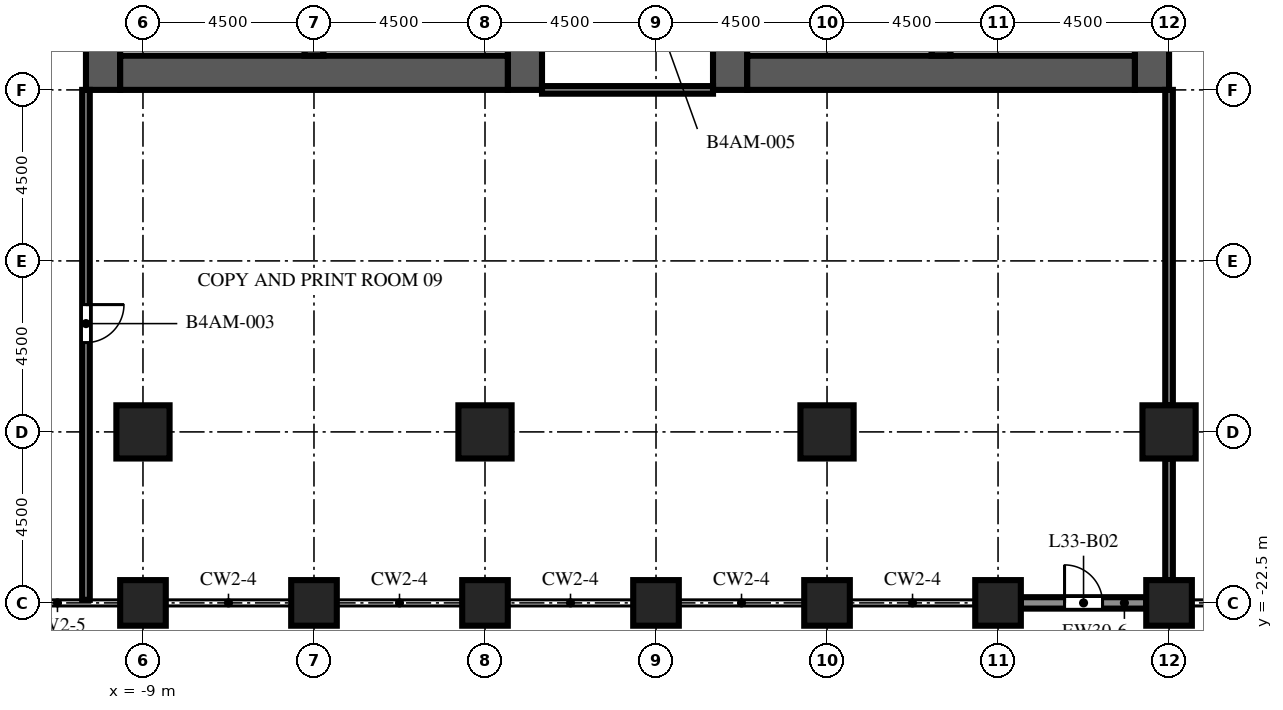
"""IFC4 building model, lengths in metres.
Left out: names, types, materials, properties, quantities, classifications, styles, units other than length and angle.
Written with IfcOpenShell. Run it as: python <this file> out.ifc"""

import sys

from ifc_helpers import new_model, si_unit, direction, frame, frame_2d, origin, origin_2d, place, context, subcontext, project, spatial, rectangle, extrude, element, fill, save


model = new_model("IFC4")
c1 = context("Model", 3, precision=1e-05, world=origin(), true_north=direction((0.0, 1.0)))
c2 = subcontext(c1, "Body", "Model", "MODEL_VIEW")
j1 = project(units=[si_unit("LENGTHUNIT", "METRE"), si_unit("PLANEANGLEUNIT", "RADIAN")], contexts=[c1])
p1 = place(None, origin())
s1 = spatial("IfcSite", under=j1, at=p1, CompositionType="ELEMENT")
p2 = place(p1, origin())
s2 = spatial("IfcBuilding", under=s1, at=p2, CompositionType="ELEMENT")
p3 = place(p2, frame((0.0, 0.0, 145.4)))
s3 = spatial("IfcBuildingStorey", under=s2, at=p3, CompositionType="ELEMENT", Elevation=145.4)
for number, where, z_axis, x_axis in (
    (1, (-9.0, -22.5, 0.0), (0.0, 0.0, 1.0), (1.0, 0.0, 0.0)),
    (2, (-4.5, -22.5, 0.0), (0.0, 0.0, 1.0), (1.0, 0.0, 0.0)),
    (3, (0.0, -22.5, 0.0), (0.0, 0.0, 1.0), (1.0, 0.0, 0.0)),
    (4, (4.5, -22.5, 0.0), (0.0, 0.0, 1.0), (1.0, 0.0, 0.0)),
    (5, (9.0, -22.5, 0.0), (0.0, 0.0, 1.0), (1.0, 0.0, 0.0)),
    (6, (13.5, -22.5, 0.0), (0.0, 0.0, 1.0), (1.0, 0.0, 0.0)),
    (7, (18.0, -22.5, 0.0), (0.0, 0.0, 1.0), (1.0, 0.0, 0.0)),
):
    element("IfcColumn", number, at=place(p3, frame(where, z_axis=z_axis, x_axis=x_axis)), inside=s3, PredefinedType="COLUMN", context=c2, shape_type="SweptSolid", body=[
        extrude(rectangle(XDim=1.2, YDim=1.2, at=origin_2d()), origin(), (0.0, 0.0, 1.0), 6.0),
    ])
for number, where, z_axis, x_axis in (
    (8, (-9.0, -18.0, 0.0), (0.0, 0.0, 1.0), (1.0, 0.0, 0.0)),
    (9, (0.0, -18.0, 0.0), (0.0, 0.0, 1.0), (1.0, 0.0, 0.0)),
    (10, (9.0, -18.0, 0.0), (0.0, 0.0, 1.0), (1.0, 0.0, 0.0)),
    (11, (18.0, -18.0, 0.0), (0.0, 0.0, 1.0), (1.0, 0.0, 0.0)),
):
    element("IfcColumn", number, at=place(p3, frame(where, z_axis=z_axis, x_axis=x_axis)), inside=s3, PredefinedType="COLUMN", context=c2, shape_type="SweptSolid", body=[
        extrude(rectangle(XDim=1.4, YDim=1.4, at=origin_2d()), origin(), (0.0, 0.0, 1.0), 6.0),
    ])
p4 = place(p3, frame((-10.05, -9.0, 0.0), z_axis=(0.0, 0.0, 1.0), x_axis=(0.0, 1.0, 0.0)))
e12 = element("IfcWall", 12, at=p4, inside=s3, PredefinedType="SHEAR", context=c2, shape_type="SweptSolid", body=[
    extrude(rectangle(XDim=27.5, YDim=0.9, at=frame_2d((13.75, 0.0))), origin(), (0.0, 0.0, 1.0), 6.0),
])
p5 = place(p4, frame((12.55, 0.0, 0.0)))
e13 = element("IfcOpeningElement", 13, at=p5, cuts=e12, PredefinedType="OPENING", context=c2, shape_type="SweptSolid", body=[
    extrude(rectangle(XDim=2.4, YDim=2.4, at=frame_2d((1.2, 1.2))), frame((0.0, 0.46, 0.0), z_axis=(0.0, -1.0, 0.0), x_axis=(1.0, 0.0, 0.0)), (0.0, 0.0, 1.0), 0.92),
])
p6 = place(p4, frame((6.825, 0.0, 0.0)))
e14 = element("IfcOpeningElement", 14, at=p6, cuts=e12, PredefinedType="OPENING", context=c2, shape_type="SweptSolid", body=[
    extrude(rectangle(XDim=1.2, YDim=2.1, at=frame_2d((0.6, 1.05))), frame((0.0, 0.46, 0.0), z_axis=(0.0, -1.0, 0.0), x_axis=(1.0, 0.0, 0.0)), (0.0, 0.0, 1.0), 0.92),
])
p7 = place(p4, frame((19.475, 0.0, 0.0)))
e15 = element("IfcOpeningElement", 15, at=p7, cuts=e12, PredefinedType="OPENING", context=c2, shape_type="SweptSolid", body=[
    extrude(rectangle(XDim=1.2, YDim=2.1, at=frame_2d((0.6, 1.05))), frame((0.0, 0.46, 0.0), z_axis=(0.0, -1.0, 0.0), x_axis=(1.0, 0.0, 0.0)), (0.0, 0.0, 1.0), 0.92),
])
p8 = place(p3, frame((1.05, -9.0, 0.0), z_axis=(0.0, 0.0, 1.0), x_axis=(0.0, 1.0, 0.0)))
e16 = element("IfcWall", 16, at=p8, inside=s3, PredefinedType="SHEAR", context=c2, shape_type="SweptSolid", body=[
    extrude(rectangle(XDim=27.5, YDim=0.9, at=frame_2d((13.75, 0.0))), origin(), (0.0, 0.0, 1.0), 6.0),
])
p9 = place(p8, frame((12.55, 0.0, 0.0)))
e17 = element("IfcOpeningElement", 17, at=p9, cuts=e16, PredefinedType="OPENING", context=c2, shape_type="SweptSolid", body=[
    extrude(rectangle(XDim=2.4, YDim=2.4, at=frame_2d((1.2, 1.2))), frame((0.0, 0.46, 0.0), z_axis=(0.0, -1.0, 0.0), x_axis=(1.0, 0.0, 0.0)), (0.0, 0.0, 1.0), 0.92),
])
p10 = place(p8, frame((5.51, 0.0, 0.0)))
e18 = element("IfcOpeningElement", 18, at=p10, cuts=e16, PredefinedType="OPENING", context=c2, shape_type="SweptSolid", body=[
    extrude(rectangle(XDim=0.923, YDim=2.1, at=frame_2d((0.461, 1.05))), frame((0.0, 0.46, 0.0), z_axis=(0.0, -1.0, 0.0), x_axis=(1.0, 0.0, 0.0)), (0.0, 0.0, 1.0), 0.92),
])
p11 = place(p8, frame((23.427, 0.0, 0.0)))
e19 = element("IfcOpeningElement", 19, at=p11, cuts=e16, PredefinedType="OPENING", context=c2, shape_type="SweptSolid", body=[
    extrude(rectangle(XDim=1.2, YDim=2.1, at=frame_2d((0.6, 1.05))), frame((0.0, 0.46, 0.0), z_axis=(0.0, -1.0, 0.0), x_axis=(1.0, 0.0, 0.0)), (0.0, 0.0, 1.0), 0.92),
])
p12 = place(p3, frame((-9.6, -8.55, 0.0), z_axis=(0.0, 0.0, 1.0), x_axis=(1.0, 0.0, 0.0)))
e20 = element("IfcWall", 20, at=p12, inside=s3, PredefinedType="SHEAR", context=c2, shape_type="SweptSolid", body=[
    extrude(rectangle(XDim=10.2, YDim=0.9, at=frame_2d((5.1, 0.0))), origin(), (0.0, 0.0, 1.0), 6.0),
])
p13 = place(p3, frame((-4.5, -8.1, 0.0), z_axis=(0.0, 0.0, 1.0), x_axis=(0.0, 1.0, 0.0)))
e21 = element("IfcWall", 21, at=p13, inside=s3, PredefinedType="SHEAR", context=c2, shape_type="SweptSolid", body=[
    extrude(rectangle(XDim=7.35, YDim=0.5, at=frame_2d((3.675, 0.0))), origin(), (0.0, 0.0, 1.0), 6.0),
])
p14 = place(p3, frame((6.45, -9.0, 0.0), z_axis=(0.0, 0.0, 1.0), x_axis=(0.0, 1.0, 0.0)))
e22 = element("IfcWall", 22, at=p14, inside=s3, PredefinedType="SHEAR", context=c2, shape_type="SweptSolid", body=[
    extrude(rectangle(XDim=27.5, YDim=0.9, at=frame_2d((13.75, 0.0))), origin(), (0.0, 0.0, 1.0), 6.0),
])
p15 = place(p14, frame((12.55, 0.0, 0.0)))
e23 = element("IfcOpeningElement", 23, at=p15, cuts=e22, PredefinedType="OPENING", context=c2, shape_type="SweptSolid", body=[
    extrude(rectangle(XDim=2.4, YDim=2.4, at=frame_2d((1.2, 1.2))), frame((0.0, 0.46, 0.0), z_axis=(0.0, -1.0, 0.0), x_axis=(1.0, 0.0, 0.0)), (0.0, 0.0, 1.0), 0.92),
])
p16 = place(p14, frame((5.51, 0.0, 0.0)))
e24 = element("IfcOpeningElement", 24, at=p16, cuts=e22, PredefinedType="OPENING", context=c2, shape_type="SweptSolid", body=[
    extrude(rectangle(XDim=0.923, YDim=2.1, at=frame_2d((0.461, 1.05))), frame((0.0, 0.46, 0.0), z_axis=(0.0, -1.0, 0.0), x_axis=(1.0, 0.0, 0.0)), (0.0, 0.0, 1.0), 0.92),
])
p17 = place(p14, frame((23.427, 0.0, 0.0)))
e25 = element("IfcOpeningElement", 25, at=p17, cuts=e22, PredefinedType="OPENING", context=c2, shape_type="SweptSolid", body=[
    extrude(rectangle(XDim=1.2, YDim=2.1, at=frame_2d((0.6, 1.05))), frame((0.0, 0.46, 0.0), z_axis=(0.0, -1.0, 0.0), x_axis=(1.0, 0.0, 0.0)), (0.0, 0.0, 1.0), 0.92),
])
p18 = place(p3, frame((17.55, -9.0, 0.0), z_axis=(0.0, 0.0, 1.0), x_axis=(0.0, 1.0, 0.0)))
e26 = element("IfcWall", 26, at=p18, inside=s3, PredefinedType="SHEAR", context=c2, shape_type="SweptSolid", body=[
    extrude(rectangle(XDim=27.5, YDim=0.9, at=frame_2d((13.75, 0.0))), origin(), (0.0, 0.0, 1.0), 6.0),
])
p19 = place(p18, frame((12.55, 0.0, 0.0)))
e27 = element("IfcOpeningElement", 27, at=p19, cuts=e26, PredefinedType="OPENING", context=c2, shape_type="SweptSolid", body=[
    extrude(rectangle(XDim=2.4, YDim=2.4, at=frame_2d((1.2, 1.2))), frame((0.0, 0.46, 0.0), z_axis=(0.0, -1.0, 0.0), x_axis=(1.0, 0.0, 0.0)), (0.0, 0.0, 1.0), 0.92),
])
p20 = place(p18, frame((6.825, 0.0, 0.0)))
e28 = element("IfcOpeningElement", 28, at=p20, cuts=e26, PredefinedType="OPENING", context=c2, shape_type="SweptSolid", body=[
    extrude(rectangle(XDim=1.2, YDim=2.1, at=frame_2d((0.6, 1.05))), frame((0.0, 0.46, 0.0), z_axis=(0.0, -1.0, 0.0), x_axis=(1.0, 0.0, 0.0)), (0.0, 0.0, 1.0), 0.92),
])
p21 = place(p18, frame((19.475, 0.0, 0.0)))
e29 = element("IfcOpeningElement", 29, at=p21, cuts=e26, PredefinedType="OPENING", context=c2, shape_type="SweptSolid", body=[
    extrude(rectangle(XDim=1.2, YDim=2.1, at=frame_2d((0.6, 1.05))), frame((0.0, 0.46, 0.0), z_axis=(0.0, -1.0, 0.0), x_axis=(1.0, 0.0, 0.0)), (0.0, 0.0, 1.0), 0.92),
])
p22 = place(p3, frame((6.9, -8.55, 0.0), z_axis=(0.0, 0.0, 1.0), x_axis=(1.0, 0.0, 0.0)))
e30 = element("IfcWall", 30, at=p22, inside=s3, PredefinedType="SHEAR", context=c2, shape_type="SweptSolid", body=[
    extrude(rectangle(XDim=10.2, YDim=0.9, at=frame_2d((5.1, 0.0))), origin(), (0.0, 0.0, 1.0), 6.0),
])
p23 = place(p3, frame((12.0, -8.1, 0.0), z_axis=(0.0, 0.0, 1.0), x_axis=(0.0, 1.0, 0.0)))
e31 = element("IfcWall", 31, at=p23, inside=s3, PredefinedType="SHEAR", context=c2, shape_type="SweptSolid", body=[
    extrude(rectangle(XDim=7.35, YDim=0.5, at=frame_2d((3.675, 0.0))), origin(), (0.0, 0.0, 1.0), 6.0),
])
p24 = place(p3, frame((17.4, -22.5, 0.0), z_axis=(0.0, 0.0, 1.0), x_axis=(-1.0, 0.0, 0.0)))
e32 = element("IfcWall", 32, at=p24, inside=s3, PredefinedType="SOLIDWALL", context=c2, shape_type="SweptSolid", body=[
    extrude(rectangle(XDim=3.3, YDim=0.3, at=frame_2d((1.65, 0.0))), origin(), (0.0, 0.0, 1.0), 4.5),
])
p25 = place(p24, frame((1.15, 0.0, 0.0)))
e33 = element("IfcOpeningElement", 33, at=p25, cuts=e32, PredefinedType="OPENING", context=c2, shape_type="SweptSolid", body=[
    extrude(rectangle(XDim=1.0, YDim=2.2, at=frame_2d((0.5, 1.1))), frame((0.0, 0.16, 0.0), z_axis=(0.0, -1.0, 0.0), x_axis=(1.0, 0.0, 0.0)), (0.0, 0.0, 1.0), 0.32),
])
for number, where, z_axis, x_axis in (
    (34, (-1.825, -8.1, 0.0), (0.0, 0.0, 1.0), (0.0, 1.0, 0.0)),
    (35, (9.325, -8.1, 0.0), (0.0, 0.0, 1.0), (0.0, 1.0, 0.0)),
):
    element("IfcWall", number, at=place(p3, frame(where, z_axis=z_axis, x_axis=x_axis)), inside=s3, PredefinedType="PARTITIONING", context=c2, shape_type="SweptSolid", body=[
        extrude(rectangle(XDim=4.41, YDim=0.1, at=frame_2d((2.205, 0.0))), origin(), (0.0, 0.0, 1.0), 5.4),
    ])
p26 = place(p3, frame((-10.5, -9.0, 0.0), z_axis=(0.0, 0.0, 1.0), x_axis=(0.0, -1.0, 0.0)))
e36 = element("IfcWall", 36, at=p26, inside=s3, PredefinedType="PARTITIONING", context=c2, shape_type="SweptSolid", body=[
    extrude(rectangle(XDim=13.42, YDim=0.2, at=frame_2d((6.71, 0.0))), origin(), (0.0, 0.0, 1.0), 5.4),
])
p27 = place(p26, frame((5.65, 0.0, 0.0)))
e37 = element("IfcOpeningElement", 37, at=p27, cuts=e36, PredefinedType="OPENING", context=c2, shape_type="SweptSolid", body=[
    extrude(rectangle(XDim=1.0, YDim=2.1, at=frame_2d((0.5, 1.05))), frame((0.0, 0.11, 0.0), z_axis=(0.0, -1.0, 0.0), x_axis=(1.0, 0.0, 0.0)), (0.0, 0.0, 1.0), 0.22),
])
p28 = place(p3, frame((18.0, -21.9, 0.0), z_axis=(0.0, 0.0, 1.0), x_axis=(0.0, 1.0, 0.0)))
e38 = element("IfcWall", 38, at=p28, inside=s3, PredefinedType="PARTITIONING", context=c2, shape_type="SweptSolid", body=[
    extrude(rectangle(XDim=3.2, YDim=0.2, at=frame_2d((1.6, 0.0))), origin(), (0.0, 0.0, 1.0), 5.4),
])
p29 = place(p3, frame((18.0, -17.3, 0.0), z_axis=(0.0, 0.0, 1.0), x_axis=(0.0, 1.0, 0.0)))
e39 = element("IfcWall", 39, at=p29, inside=s3, PredefinedType="PARTITIONING", context=c2, shape_type="SweptSolid", body=[
    extrude(rectangle(XDim=8.3, YDim=0.2, at=frame_2d((4.15, 0.0))), origin(), (0.0, 0.0, 1.0), 5.4),
])
p30 = place(p3, frame((1.5, -9.0, 0.0), z_axis=(0.0, 0.0, 1.0), x_axis=(1.0, 0.0, 0.0)))
e40 = element("IfcWall", 40, at=p30, inside=s3, PredefinedType="PARTITIONING", context=c2, shape_type="SweptSolid", body=[
    extrude(rectangle(XDim=4.5, YDim=0.2, at=frame_2d((2.25, 0.0))), origin(), (0.0, 0.0, 1.0), 5.4),
])
p31 = place(p25, origin())
e41 = element("IfcDoor", 41, at=p31, inside=s3, OperationType="SINGLE_SWING_RIGHT", PredefinedType="DOOR", context=c2, shape_type="SweptSolid", body=[
    extrude(rectangle(XDim=1.0, YDim=2.2, at=frame_2d((0.5, 1.1))), frame((0.0, 0.025, 0.0), z_axis=(0.0, -1.0, 0.0), x_axis=(1.0, 0.0, 0.0)), (0.0, 0.0, 1.0), 0.05),
])
fill(e33, e41)
p32 = place(p27, origin())
e42 = element("IfcDoor", 42, at=p32, inside=s3, OperationType="SINGLE_SWING_LEFT", PredefinedType="DOOR", context=c2, shape_type="SweptSolid", body=[
    extrude(rectangle(XDim=1.0, YDim=2.1, at=frame_2d((0.5, 1.05))), frame((0.0, 0.025, 0.0), z_axis=(0.0, -1.0, 0.0), x_axis=(1.0, 0.0, 0.0)), (0.0, 0.0, 1.0), 0.05),
])
fill(e37, e42)
save(model, sys.argv[1])
